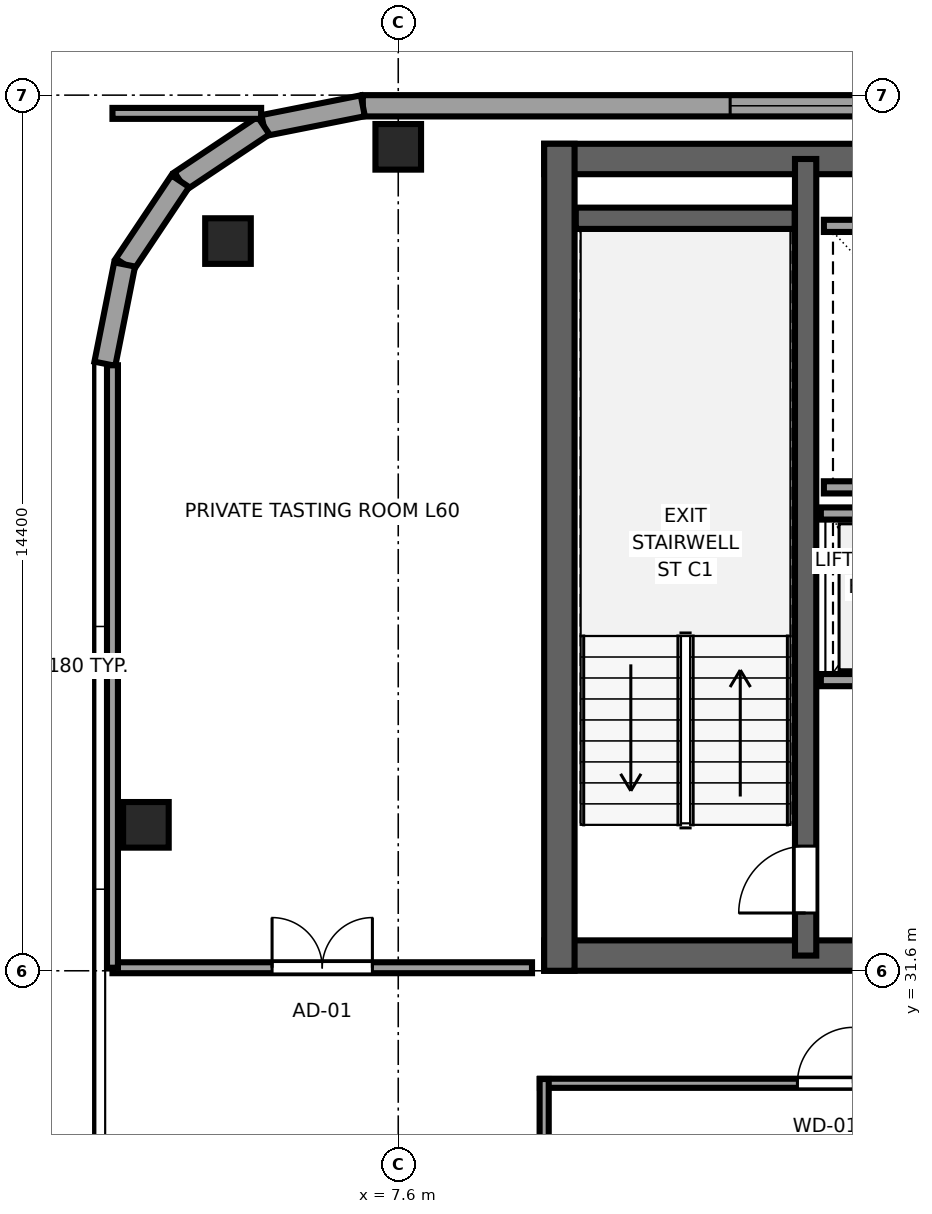
"""IFC4 building model, lengths in metres.
Left out: names, types, materials, properties, quantities, classifications, styles, units other than length and angle.
Written with IfcOpenShell. Run it as: python <this file> out.ifc"""

import sys

from ifc_helpers import new_model, si_unit, direction, frame, frame_2d, origin, origin_2d, place, context, subcontext, project, spatial, rectangle, extrude, source, transform, mapped, element, fill, save


model = new_model("IFC4")
c1 = context("Model", 3, precision=1e-05, world=origin(), true_north=direction((0.0, 1.0)))
c2 = subcontext(c1, "Body", "Model", "MODEL_VIEW")
j1 = project(units=[si_unit("LENGTHUNIT", "METRE"), si_unit("PLANEANGLEUNIT", "RADIAN")], contexts=[c1])
p1 = place(None, origin())
s1 = spatial("IfcSite", under=j1, at=p1, CompositionType="ELEMENT")
p2 = place(p1, origin())
s2 = spatial("IfcBuilding", under=s1, at=p2, CompositionType="ELEMENT")
p3 = place(p2, frame((0.0, 0.0, 227.45)))
s3 = spatial("IfcBuildingStorey", under=s2, at=p3, CompositionType="ELEMENT", Elevation=227.45)
p4 = place(p3, frame((10.0, 31.85, 0.0), z_axis=(0.0, 0.0, 1.0), x_axis=(1.0, 0.0, 0.0)))
e1 = element("IfcWall", 1, at=p4, inside=s3, PredefinedType="SHEAR", context=c2, shape_type="SweptSolid", body=[
    extrude(rectangle(XDim=26.0, YDim=0.5, at=frame_2d((13.0, 0.0))), origin(), (0.0, 0.0, 1.0), 3.55),
])
p5 = place(p4, frame((7.45, 0.0, 0.0), z_axis=(0.0, 0.0, 1.0), x_axis=(-1.0, 0.0, 0.0)))
e2 = element("IfcOpeningElement", 2, at=p5, cuts=e1, PredefinedType="OPENING", context=c2, shape_type="SweptSolid", body=[
    extrude(rectangle(XDim=1.5, YDim=2.04, at=frame_2d((0.75, 1.02))), frame((0.0, 0.26, 0.0), z_axis=(0.0, -1.0, 0.0), x_axis=(1.0, 0.0, 0.0)), (0.0, 0.0, 1.0), 0.52),
])
p6 = place(p4, frame((13.75, 0.0, 0.0), z_axis=(0.0, 0.0, 1.0), x_axis=(-1.0, 0.0, 0.0)))
e3 = element("IfcOpeningElement", 3, at=p6, cuts=e1, PredefinedType="OPENING", context=c2, shape_type="SweptSolid", body=[
    extrude(rectangle(XDim=1.5, YDim=2.04, at=frame_2d((0.75, 1.02))), frame((0.0, 0.26, 0.0), z_axis=(0.0, -1.0, 0.0), x_axis=(1.0, 0.0, 0.0)), (0.0, 0.0, 1.0), 0.52),
])
p7 = place(p4, frame((20.05, 0.0, 0.0), z_axis=(0.0, 0.0, 1.0), x_axis=(-1.0, 0.0, 0.0)))
e4 = element("IfcOpeningElement", 4, at=p7, cuts=e1, PredefinedType="OPENING", context=c2, shape_type="SweptSolid", body=[
    extrude(rectangle(XDim=1.5, YDim=2.04, at=frame_2d((0.75, 1.02))), frame((0.0, 0.26, 0.0), z_axis=(0.0, -1.0, 0.0), x_axis=(1.0, 0.0, 0.0)), (0.0, 0.0, 1.0), 0.52),
])
p8 = place(p3, frame((10.0, 44.95, 0.0), z_axis=(0.0, 0.0, 1.0), x_axis=(1.0, 0.0, 0.0)))
e5 = element("IfcWall", 5, at=p8, inside=s3, PredefinedType="SHEAR", context=c2, shape_type="SweptSolid", body=[
    extrude(rectangle(XDim=26.0, YDim=0.5, at=frame_2d((13.0, 0.0))), origin(), (0.0, 0.0, 1.0), 3.55),
])
p9 = place(p3, frame((10.25, 31.6, 0.0), z_axis=(0.0, 0.0, 1.0), x_axis=(0.0, 1.0, 0.0)))
e6 = element("IfcWall", 6, at=p9, inside=s3, PredefinedType="SHEAR", context=c2, shape_type="SweptSolid", body=[
    extrude(rectangle(XDim=13.6, YDim=0.5, at=frame_2d((6.8, 0.0))), origin(), (0.0, 0.0, 1.0), 3.55),
])
p10 = place(p3, frame((14.3, 31.85, 0.0), z_axis=(0.0, 0.0, 1.0), x_axis=(0.0, 1.0, 0.0)))
e7 = element("IfcWall", 7, at=p10, inside=s3, PredefinedType="SHEAR", context=c2, shape_type="SweptSolid", body=[
    extrude(rectangle(XDim=13.1, YDim=0.35, at=frame_2d((6.55, 0.0))), origin(), (0.0, 0.0, 1.0), 3.55),
])
p11 = place(p10, frame((0.7, 0.0, 0.0)))
e8 = element("IfcOpeningElement", 8, at=p11, cuts=e7, PredefinedType="OPENING", context=c2, shape_type="SweptSolid", body=[
    extrude(rectangle(XDim=1.1, YDim=2.12, at=frame_2d((0.55, 1.06))), frame((0.0, 0.185, 0.0), z_axis=(0.0, -1.0, 0.0), x_axis=(1.0, 0.0, 0.0)), (0.0, 0.0, 1.0), 0.37),
])
p12 = place(p3, frame((10.52, 43.975, 0.0), z_axis=(0.0, 0.0, 1.0), x_axis=(1.0, 0.0, 0.0)))
e9 = element("IfcWall", 9, at=p12, inside=s3, PredefinedType="SHEAR", context=c2, shape_type="SweptSolid", body=[
    extrude(rectangle(XDim=3.6, YDim=0.35, at=frame_2d((1.8, 0.0))), origin(), (0.0, 0.0, 1.0), 3.55),
])
m1 = source(origin(), c2, "Body", "SweptSolid", [
    extrude(rectangle(XDim=0.75, YDim=0.75, at=origin_2d()), origin(), (0.0, 0.0, 1.0), 3.55),
])
for number, where, z_axis, x_axis in (
    (10, (4.8, 43.6, 0.0), (0.0, 0.0, 1.0), (1.0, 0.0, 0.0)),
    (11, (7.6, 45.15, 0.0), (0.0, 0.0, 1.0), (1.0, 0.0, 0.0)),
    (12, (3.45, 34.0, 0.0), (0.0, 0.0, 1.0), (1.0, 0.0, 0.0)),
):
    element("IfcColumn", number, at=place(p3, frame(where, z_axis=z_axis, x_axis=x_axis)), inside=s3, PredefinedType="COLUMN", context=c2, shape_type="MappedRepresentation", body=[
        mapped(m1, transform((0.0, 0.0, 0.0), x_axis=(1.0, 0.0, 0.0), y_axis=(0.0, 1.0, 0.0), z_axis=(0.0, 0.0, 1.0), scale=1.0)),
    ])
p13 = place(p3, frame((35.383, 45.825, 0.0), z_axis=(0.0, 0.0, 1.0), x_axis=(-1.0, 0.0, 0.0)))
e13 = element("IfcWall", 13, at=p13, inside=s3, PredefinedType="SOLIDWALL", context=c2, shape_type="SweptSolid", body=[
    extrude(rectangle(XDim=28.366, YDim=0.35, at=frame_2d((14.183, 0.0))), origin(), (0.0, 0.0, 1.0), 3.37),
])
p14 = place(p13, frame((1.514, 0.0, 0.68)))
e14 = element("IfcOpeningElement", 14, at=p14, cuts=e13, PredefinedType="OPENING", context=c2, shape_type="SweptSolid", body=[
    extrude(rectangle(XDim=2.7, YDim=1.95, at=frame_2d((1.35, 0.975))), frame((0.0, 0.185, 0.0), z_axis=(0.0, -1.0, 0.0), x_axis=(1.0, 0.0, 0.0)), (0.0, 0.0, 1.0), 0.37),
])
p15 = place(p13, frame((6.041, 0.0, 0.68)))
e15 = element("IfcOpeningElement", 15, at=p15, cuts=e13, PredefinedType="OPENING", context=c2, shape_type="SweptSolid", body=[
    extrude(rectangle(XDim=2.7, YDim=1.95, at=frame_2d((1.35, 0.975))), frame((0.0, 0.185, 0.0), z_axis=(0.0, -1.0, 0.0), x_axis=(1.0, 0.0, 0.0)), (0.0, 0.0, 1.0), 0.37),
])
p16 = place(p13, frame((10.569, 0.0, 0.68)))
e16 = element("IfcOpeningElement", 16, at=p16, cuts=e13, PredefinedType="OPENING", context=c2, shape_type="SweptSolid", body=[
    extrude(rectangle(XDim=2.7, YDim=1.95, at=frame_2d((1.35, 0.975))), frame((0.0, 0.185, 0.0), z_axis=(0.0, -1.0, 0.0), x_axis=(1.0, 0.0, 0.0)), (0.0, 0.0, 1.0), 0.37),
])
p17 = place(p13, frame((15.097, 0.0, 0.68)))
e17 = element("IfcOpeningElement", 17, at=p17, cuts=e13, PredefinedType="OPENING", context=c2, shape_type="SweptSolid", body=[
    extrude(rectangle(XDim=2.7, YDim=1.95, at=frame_2d((1.35, 0.975))), frame((0.0, 0.185, 0.0), z_axis=(0.0, -1.0, 0.0), x_axis=(1.0, 0.0, 0.0)), (0.0, 0.0, 1.0), 0.37),
])
p18 = place(p13, frame((19.624, 0.0, 0.68)))
e18 = element("IfcOpeningElement", 18, at=p18, cuts=e13, PredefinedType="OPENING", context=c2, shape_type="SweptSolid", body=[
    extrude(rectangle(XDim=2.7, YDim=1.95, at=frame_2d((1.35, 0.975))), frame((0.0, 0.185, 0.0), z_axis=(0.0, -1.0, 0.0), x_axis=(1.0, 0.0, 0.0)), (0.0, 0.0, 1.0), 0.37),
])
p19 = place(p3, frame((7.017, 45.825, 0.0), z_axis=(0.0, 0.0, 1.0), x_axis=(-0.980788844421, -0.195072403631, 0.0)))
e19 = element("IfcWall", 19, at=p19, inside=s3, PredefinedType="SOLIDWALL", context=c2, shape_type="SweptSolid", body=[
    extrude(rectangle(XDim=1.665, YDim=0.35, at=frame_2d((0.832, 0.0))), origin(), (0.0, 0.0, 1.0), 3.37),
])
for number, where, z_axis, x_axis in (
    (20, (5.385, 45.5, 0.0), (0.0, 0.0, 1.0), (-0.832, -0.556, 0.0)),
    (21, (4.015, 44.585, 0.0), (0.0, 0.0, 1.0), (-0.556, -0.831, 0.0)),
):
    element("IfcWall", number, at=place(p3, frame(where, z_axis=z_axis, x_axis=x_axis)), inside=s3, PredefinedType="SOLIDWALL", context=c2, shape_type="SweptSolid", body=[
        extrude(rectangle(XDim=1.647, YDim=0.35, at=frame_2d((0.824, 0.0))), origin(), (0.0, 0.0, 1.0), 2.9),
    ])
p20 = place(p3, frame((3.1, 43.216, 0.0), z_axis=(0.0, 0.0, 1.0), x_axis=(-0.195044345786, -0.980794424524, 0.0)))
e22 = element("IfcWall", 22, at=p20, inside=s3, PredefinedType="SOLIDWALL", context=c2, shape_type="SweptSolid", body=[
    extrude(rectangle(XDim=1.665, YDim=0.35, at=frame_2d((0.833, 0.0))), origin(), (0.0, 0.0, 1.0), 3.37),
])
for number, where, z_axis, x_axis in (
    (23, (14.6, 39.55, 0.0), (0.0, 0.0, 1.0), (1.0, 0.0, 0.0)),
    (24, (14.6, 43.85, 0.0), (0.0, 0.0, 1.0), (1.0, 0.0, 0.0)),
):
    element("IfcWall", number, at=place(p3, frame(where, z_axis=z_axis, x_axis=x_axis)), inside=s3, PredefinedType="SOLIDWALL", context=c2, shape_type="SweptSolid", body=[
        extrude(rectangle(XDim=4.1, YDim=0.2, at=frame_2d((2.05, 0.0))), origin(), (0.0, 0.0, 1.0), 3.37),
    ])
p21 = place(p3, frame((14.55, 36.38, 0.0), z_axis=(0.0, 0.0, 1.0), x_axis=(1.0, 0.0, 0.0)))
e25 = element("IfcWall", 25, at=p21, inside=s3, PredefinedType="SOLIDWALL", context=c2, shape_type="SweptSolid", body=[
    extrude(rectangle(XDim=4.075, YDim=0.2, at=frame_2d((2.038, 0.0))), origin(), (0.0, 0.0, 1.0), 3.37),
])
p22 = place(p21, frame((0.55, 0.0, 0.0)))
e26 = element("IfcOpeningElement", 26, at=p22, cuts=e25, PredefinedType="OPENING", context=c2, shape_type="SweptSolid", body=[
    extrude(rectangle(XDim=1.1, YDim=2.12, at=frame_2d((0.55, 1.06))), frame((0.0, 0.11, 0.0), z_axis=(0.0, -1.0, 0.0), x_axis=(1.0, 0.0, 0.0)), (0.0, 0.0, 1.0), 0.22),
])
p23 = place(p21, frame((2.45, 0.0, 0.0)))
e27 = element("IfcOpeningElement", 27, at=p23, cuts=e25, PredefinedType="OPENING", context=c2, shape_type="SweptSolid", body=[
    extrude(rectangle(XDim=1.1, YDim=2.12, at=frame_2d((0.55, 1.06))), frame((0.0, 0.11, 0.0), z_axis=(0.0, -1.0, 0.0), x_axis=(1.0, 0.0, 0.0)), (0.0, 0.0, 1.0), 0.22),
])
p24 = place(p3, frame((14.55, 39.12, 0.0), z_axis=(0.0, 0.0, 1.0), x_axis=(1.0, 0.0, 0.0)))
e28 = element("IfcWall", 28, at=p24, inside=s3, PredefinedType="SOLIDWALL", context=c2, shape_type="SweptSolid", body=[
    extrude(rectangle(XDim=4.075, YDim=0.2, at=frame_2d((2.038, 0.0))), origin(), (0.0, 0.0, 1.0), 3.37),
])
p25 = place(p3, frame((2.9, 31.65, 0.0), z_axis=(0.0, 0.0, 1.0), x_axis=(1.0, 0.0, 0.0)))
e29 = element("IfcWall", 29, at=p25, inside=s3, PredefinedType="PARTITIONING", context=c2, shape_type="SweptSolid", body=[
    extrude(rectangle(XDim=6.9, YDim=0.18, at=frame_2d((3.45, 0.0))), origin(), (0.0, 0.0, 1.0), 3.37),
])
p26 = place(p25, frame((2.625, 0.0, 0.0)))
e30 = element("IfcOpeningElement", 30, at=p26, cuts=e29, PredefinedType="OPENING", context=c2, shape_type="SweptSolid", body=[
    extrude(rectangle(XDim=1.65, YDim=2.15, at=frame_2d((0.825, 1.075))), frame((0.0, 0.1, 0.0), z_axis=(0.0, -1.0, 0.0), x_axis=(1.0, 0.0, 0.0)), (0.0, 0.0, 1.0), 0.2),
])
p27 = place(p3, frame((2.9, 45.7, 0.0), z_axis=(0.0, 0.0, 1.0), x_axis=(1.0, 0.0, 0.0)))
e31 = element("IfcWall", 31, at=p27, inside=s3, PredefinedType="PARTITIONING", context=c2, shape_type="SweptSolid", body=[
    extrude(rectangle(XDim=2.445, YDim=0.18, at=frame_2d((1.223, 0.0))), origin(), (0.0, 0.0, 1.0), 3.37),
])
p28 = place(p3, frame((2.9, 31.65, 0.0), z_axis=(0.0, 0.0, 1.0), x_axis=(0.0, 1.0, 0.0)))
e32 = element("IfcWall", 32, at=p28, inside=s3, PredefinedType="PARTITIONING", context=c2, shape_type="SweptSolid", body=[
    extrude(rectangle(XDim=9.908, YDim=0.18, at=frame_2d((4.954, 0.0))), origin(), (0.0, 0.0, 1.0), 3.37),
])
p29 = place(p3, frame((9.93, 29.75, 0.0), z_axis=(0.0, 0.0, 1.0), x_axis=(1.0, 0.0, 0.0)))
e33 = element("IfcWall", 33, at=p29, inside=s3, PredefinedType="PARTITIONING", context=c2, shape_type="SweptSolid", body=[
    extrude(rectangle(XDim=9.39, YDim=0.15, at=frame_2d((4.695, 0.0))), origin(), (0.0, 0.0, 1.0), 3.37),
])
p30 = place(p29, frame((4.235, 0.0, 0.0)))
e34 = element("IfcOpeningElement", 34, at=p30, cuts=e33, PredefinedType="OPENING", context=c2, shape_type="SweptSolid", body=[
    extrude(rectangle(XDim=0.92, YDim=2.01, at=frame_2d((0.46, 1.005))), frame((0.0, 0.085, 0.0), z_axis=(0.0, -1.0, 0.0), x_axis=(1.0, 0.0, 0.0)), (0.0, 0.0, 1.0), 0.17),
])
p31 = place(p3, frame((10.0, 27.03, 0.0), z_axis=(0.0, 0.0, 1.0), x_axis=(0.0, 1.0, 0.0)))
e35 = element("IfcWall", 35, at=p31, inside=s3, PredefinedType="PARTITIONING", context=c2, shape_type="SweptSolid", body=[
    extrude(rectangle(XDim=2.79, YDim=0.15, at=frame_2d((1.395, 0.0))), origin(), (0.0, 0.0, 1.0), 3.37),
])
m2 = source(origin(), c2, "Body", "SweptSolid", [
    extrude(rectangle(XDim=2.7, YDim=1.95, at=frame_2d((1.35, 0.975))), frame((0.0, 0.09, 0.0), z_axis=(0.0, -1.0, 0.0), x_axis=(1.0, 0.0, 0.0)), (0.0, 0.0, 1.0), 0.06),
])
p32 = place(p18, origin())
e36 = element("IfcWindow", 36, at=p32, inside=s3, PartitioningType="TRIPLE_PANEL_HORIZONTAL", PredefinedType="WINDOW", context=c2, shape_type="MappedRepresentation", body=[
    mapped(m2, transform((0.0, 0.0, 0.0), x_axis=(1.0, 0.0, 0.0), y_axis=(0.0, 1.0, 0.0), z_axis=(0.0, 0.0, 1.0), scale=1.0)),
])
fill(e18, e36)
m3 = source(origin(), c2, "Body", "SweptSolid", [
    extrude(rectangle(XDim=1.1, YDim=2.12, at=frame_2d((0.55, 1.06))), frame((0.0, 0.025, 0.0), z_axis=(0.0, -1.0, 0.0), x_axis=(1.0, 0.0, 0.0)), (0.0, 0.0, 1.0), 0.05),
])
p33 = place(p11, origin())
e37 = element("IfcDoor", 37, at=p33, inside=s3, OperationType="SINGLE_SWING_LEFT", PredefinedType="DOOR", context=c2, shape_type="MappedRepresentation", body=[
    mapped(m3, transform((0.0, 0.0, 0.0), x_axis=(1.0, 0.0, 0.0), y_axis=(0.0, 1.0, 0.0), z_axis=(0.0, 0.0, 1.0), scale=1.0)),
])
fill(e8, e37)
m4 = source(origin(), c2, "Body", "SweptSolid", [
    extrude(rectangle(XDim=1.65, YDim=2.15, at=frame_2d((0.825, 1.075))), frame((0.0, 0.025, 0.0), z_axis=(0.0, -1.0, 0.0), x_axis=(1.0, 0.0, 0.0)), (0.0, 0.0, 1.0), 0.05),
])
p34 = place(p26, origin())
e38 = element("IfcDoor", 38, at=p34, inside=s3, OperationType="DOUBLE_DOOR_SINGLE_SWING", PredefinedType="DOOR", context=c2, shape_type="MappedRepresentation", body=[
    mapped(m4, transform((0.0, 0.0, 0.0), x_axis=(1.0, 0.0, 0.0), y_axis=(0.0, 1.0, 0.0), z_axis=(0.0, 0.0, 1.0), scale=1.0)),
])
fill(e30, e38)
m5 = source(origin(), c2, "Body", "SweptSolid", [
    extrude(rectangle(XDim=0.92, YDim=2.01, at=frame_2d((0.46, 1.005))), frame((0.0, 0.025, 0.0), z_axis=(0.0, -1.0, 0.0), x_axis=(1.0, 0.0, 0.0)), (0.0, 0.0, 1.0), 0.05),
])
p35 = place(p30, origin())
e39 = element("IfcDoor", 39, at=p35, inside=s3, OperationType="SINGLE_SWING_RIGHT", PredefinedType="DOOR", context=c2, shape_type="MappedRepresentation", body=[
    mapped(m5, transform((0.0, 0.0, 0.0), x_axis=(1.0, 0.0, 0.0), y_axis=(0.0, 1.0, 0.0), z_axis=(0.0, 0.0, 1.0), scale=1.0)),
])
fill(e34, e39)
save(model, sys.argv[1])
